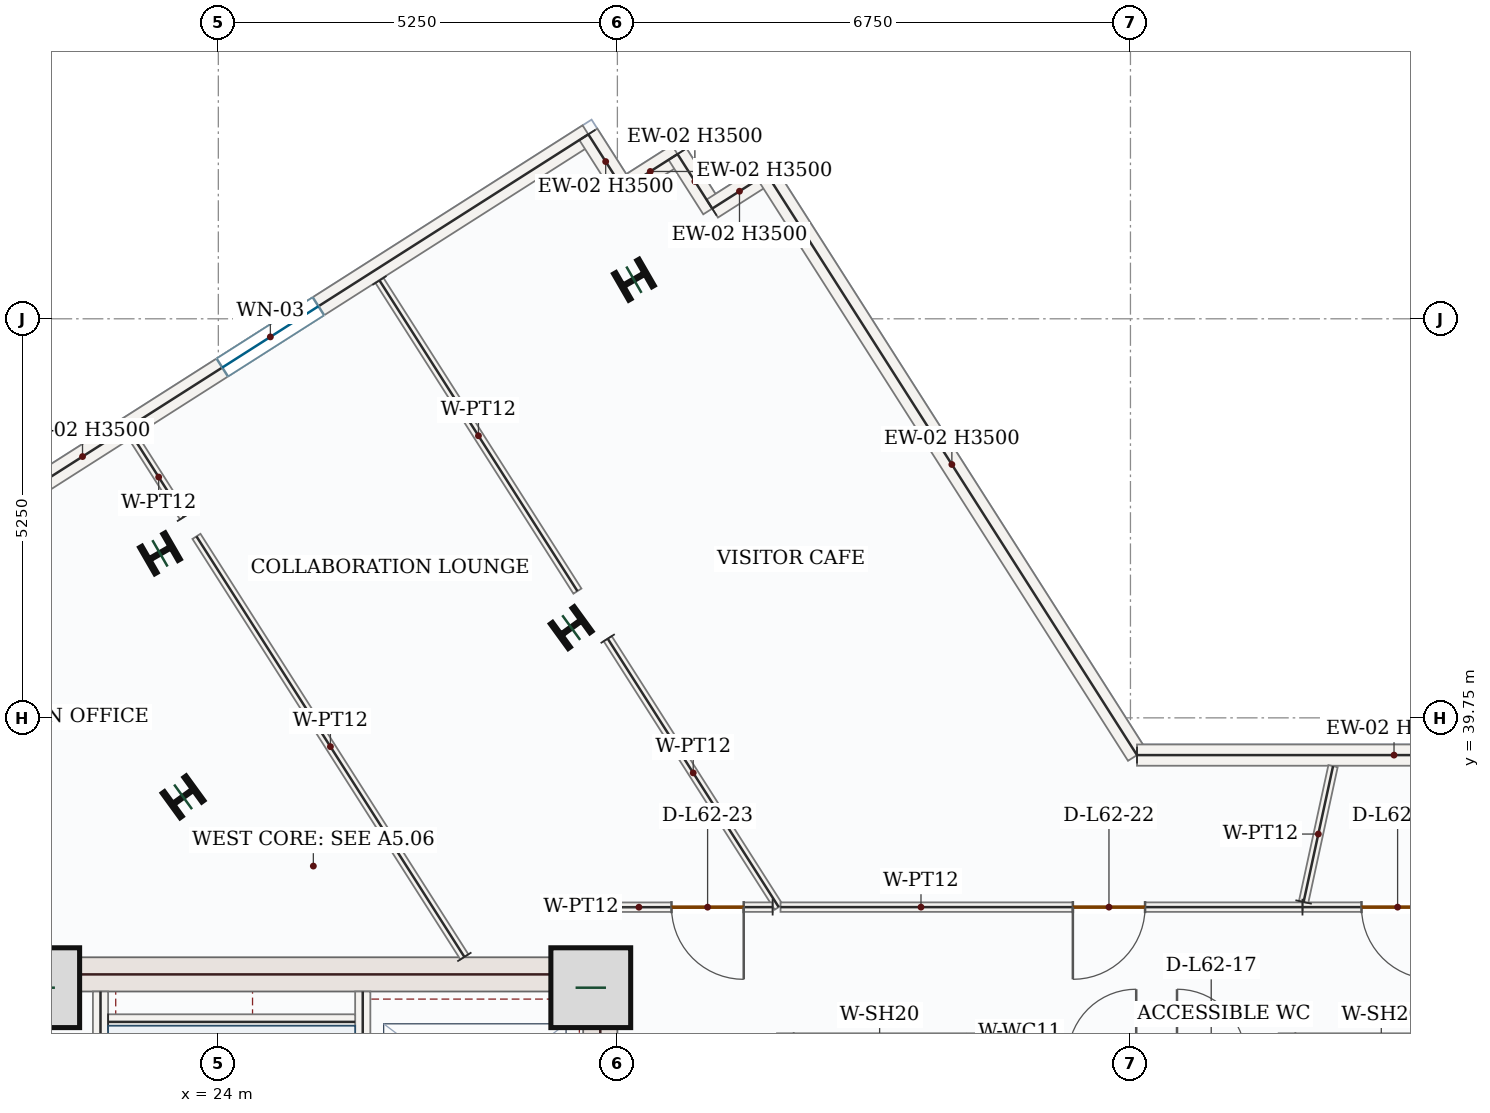
"""IFC4 building model, lengths in metres.
Left out: names, types, materials, properties, quantities, classifications, styles, units other than length and angle.
Written with IfcOpenShell. Run it as: python <this file> out.ifc"""

import sys

from ifc_helpers import new_model, si_unit, direction, frame, frame_2d, origin, origin_2d, place, context, subcontext, project, spatial, rectangle, i_section, extrude, source, transform, mapped, element, fill, save


model = new_model("IFC4")
c1 = context("Model", 3, precision=1e-05, world=origin(), true_north=direction((0.0, 1.0)))
c2 = subcontext(c1, "Body", "Model", "MODEL_VIEW")
j1 = project(units=[si_unit("LENGTHUNIT", "METRE"), si_unit("PLANEANGLEUNIT", "RADIAN")], contexts=[c1])
p1 = place(None, origin())
s1 = spatial("IfcSite", under=j1, at=p1, CompositionType="ELEMENT")
p2 = place(p1, origin())
s2 = spatial("IfcBuilding", under=s1, at=p2, CompositionType="ELEMENT")
p3 = place(p2, frame((0.0, 0.0, 261.6)))
s3 = spatial("IfcBuildingStorey", under=s2, at=p3, CompositionType="ELEMENT", Elevation=261.6)
p4 = place(p3, frame((29.025, 28.05, 0.0), z_axis=(0.0, 0.0, 1.0), x_axis=(0.0, 1.0, 0.0)))
e1 = element("IfcWall", 1, at=p4, inside=s3, PredefinedType="SHEAR", context=c2, shape_type="SweptSolid", body=[
    extrude(rectangle(XDim=8.55, YDim=0.45, at=frame_2d((4.275, 0.0))), origin(), (0.0, 0.0, 1.0), 3.5),
])
p5 = place(p4, frame((1.5, 0.0, 0.0)))
e2 = element("IfcOpeningElement", 2, at=p5, cuts=e1, PredefinedType="OPENING", context=c2, shape_type="SweptSolid", body=[
    extrude(rectangle(XDim=1.1, YDim=2.2, at=frame_2d((0.55, 1.1))), frame((0.0, 0.235, 0.0), z_axis=(0.0, -1.0, 0.0), x_axis=(1.0, 0.0, 0.0)), (0.0, 0.0, 1.0), 0.47),
])
m1 = source(origin(), c2, "Body", "SweptSolid", [
    extrude(rectangle(XDim=7.1, YDim=0.45, at=frame_2d((3.55, 0.0))), origin(), (0.0, 0.0, 1.0), 3.5),
])
p6 = place(p3, frame((21.7, 36.375, 0.0), z_axis=(0.0, 0.0, 1.0), x_axis=(1.0, 0.0, 0.0)))
e3 = element("IfcWall", 3, at=p6, inside=s3, PredefinedType="SHEAR", context=c2, shape_type="MappedRepresentation", body=[
    mapped(m1, transform((0.0, 0.0, 0.0), x_axis=(1.0, 0.0, 0.0), y_axis=(0.0, 1.0, 0.0), z_axis=(0.0, 0.0, 1.0), scale=1.0)),
])
m2 = source(origin(), c2, "Body", "SweptSolid", [
    extrude(rectangle(XDim=1.05, YDim=1.05, at=origin_2d()), origin(), (0.0, 0.0, 1.0), 3.75),
])
for number, where, z_axis, x_axis in (
    (4, (21.65, 36.2, 0.0), (0.0, 0.0, 1.0), (1.0, 0.0, 0.0)),
    (5, (28.9, 36.2, 0.0), (0.0, 0.0, 1.0), (1.0, 0.0, 0.0)),
):
    element("IfcColumn", number, at=place(p3, frame(where, z_axis=z_axis, x_axis=x_axis)), inside=s3, PredefinedType="COLUMN", context=c2, shape_type="MappedRepresentation", body=[
        mapped(m2, transform((0.0, 0.0, 0.0), x_axis=(1.0, 0.0, 0.0), y_axis=(0.0, 1.0, 0.0), z_axis=(0.0, 0.0, 1.0), scale=1.0)),
    ])
m3 = source(origin(), c2, "Body", "SweptSolid", [
    extrude(i_section(OverallWidth=0.399, OverallDepth=0.386, WebThickness=0.021, FlangeThickness=0.033, FilletRadius=0.018, at=origin_2d()), origin(), (0.0, 0.0, 1.0), 3.75),
])
for number, where, z_axis, x_axis in (
    (6, (28.643, 40.937, 0.0), (0.0, 0.0, 1.0), (-0.588, 0.809, 0.0)),
    (7, (23.536, 38.711, 0.0), (0.0, 0.0, 1.0), (-0.588, 0.809, 0.0)),
    (8, (29.468, 45.514, 0.0), (0.0, 0.0, 1.0), (-0.5, 0.866, 0.0)),
    (9, (23.232, 41.914, 0.0), (0.0, 0.0, 1.0), (-0.5, 0.866, 0.0)),
):
    element("IfcColumn", number, at=place(p3, frame(where, z_axis=z_axis, x_axis=x_axis)), inside=s3, PredefinedType="COLUMN", context=c2, shape_type="MappedRepresentation", body=[
        mapped(m3, transform((0.0, 0.0, 0.0), x_axis=(1.0, 0.0, 0.0), y_axis=(0.0, 1.0, 0.0), z_axis=(0.0, 0.0, 1.0), scale=1.0)),
    ])
p7 = place(p3, frame((20.501, 42.097, 0.0), z_axis=(0.0, 0.0, 1.0), x_axis=(0.843388777764, 0.537303796322, 0.0)))
e10 = element("IfcWall", 10, at=p7, inside=s3, PredefinedType="SOLIDWALL", context=c2, shape_type="SweptSolid", body=[
    extrude(rectangle(XDim=9.92, YDim=0.28, at=frame_2d((4.96, 0.0))), origin(), (0.0, 0.0, 1.0), 3.5),
])
p8 = place(p7, frame((4.21, 0.0, 0.85)))
e11 = element("IfcOpeningElement", 11, at=p8, cuts=e10, PredefinedType="OPENING", context=c2, shape_type="SweptSolid", body=[
    extrude(rectangle(XDim=1.5, YDim=1.5, at=frame_2d((0.75, 0.75))), frame((0.0, 0.15, 0.0), z_axis=(0.0, -1.0, 0.0), x_axis=(1.0, 0.0, 0.0)), (0.0, 0.0, 1.0), 0.3),
])
m4 = source(origin(), c2, "Body", "SweptSolid", [
    extrude(rectangle(XDim=0.85, YDim=0.28, at=frame_2d((0.425, 0.0))), origin(), (0.0, 0.0, 1.0), 3.5),
])
p9 = place(p3, frame((28.868, 47.427, 0.0), z_axis=(0.0, 0.0, 1.0), x_axis=(0.537210044462, -0.843448497615, 0.0)))
e12 = element("IfcWall", 12, at=p9, inside=s3, PredefinedType="SOLIDWALL", context=c2, shape_type="MappedRepresentation", body=[
    mapped(m4, transform((0.0, 0.0, 0.0), x_axis=(1.0, 0.0, 0.0), y_axis=(0.0, 1.0, 0.0), z_axis=(0.0, 0.0, 1.0), scale=1.0)),
])
m5 = source(origin(), c2, "Body", "SweptSolid", [
    extrude(rectangle(XDim=0.85, YDim=0.28, at=frame_2d((0.425, 0.0))), origin(), (0.0, 0.0, 1.0), 3.5),
])
p10 = place(p3, frame((29.324, 46.71, 0.0), z_axis=(0.0, 0.0, 1.0), x_axis=(0.843531374408, 0.537079901308, 0.0)))
e13 = element("IfcWall", 13, at=p10, inside=s3, PredefinedType="SOLIDWALL", context=c2, shape_type="MappedRepresentation", body=[
    mapped(m5, transform((0.0, 0.0, 0.0), x_axis=(1.0, 0.0, 0.0), y_axis=(0.0, 1.0, 0.0), z_axis=(0.0, 0.0, 1.0), scale=1.0)),
])
for number, where, z_axis, x_axis in (
    (14, (30.041, 47.167, 0.0), (0.0, 0.0, 1.0), (0.537, -0.843, 0.0)),
    (15, (30.498, 46.45, 0.0), (0.0, 0.0, 1.0), (0.843, 0.537, 0.0)),
):
    element("IfcWall", number, at=place(p3, frame(where, z_axis=z_axis, x_axis=x_axis)), inside=s3, PredefinedType="SOLIDWALL", context=c2, shape_type="MappedRepresentation", body=[
        mapped(m4, transform((0.0, 0.0, 0.0), x_axis=(1.0, 0.0, 0.0), y_axis=(0.0, 1.0, 0.0), z_axis=(0.0, 0.0, 1.0), scale=1.0)),
    ])
m6 = source(origin(), c2, "Body", "SweptSolid", [
    extrude(rectangle(XDim=9.066, YDim=0.28, at=frame_2d((4.533, 0.0))), origin(), (0.0, 0.0, 1.0), 3.5),
])
p11 = place(p3, frame((31.215, 46.906, 0.0), z_axis=(0.0, 0.0, 1.0), x_axis=(0.537298831286, -0.843391940855, 0.0)))
e16 = element("IfcWall", 16, at=p11, inside=s3, PredefinedType="SOLIDWALL", context=c2, shape_type="MappedRepresentation", body=[
    mapped(m6, transform((0.0, 0.0, 0.0), x_axis=(1.0, 0.0, 0.0), y_axis=(0.0, 1.0, 0.0), z_axis=(0.0, 0.0, 1.0), scale=1.0)),
])
m7 = source(origin(), c2, "Body", "SweptSolid", [
    extrude(rectangle(XDim=6.763, YDim=0.28, at=frame_2d((3.381, 0.0))), origin(), (0.0, 0.0, 1.0), 2.772),
])
p12 = place(p3, frame((36.086, 39.26, 0.0), z_axis=(0.0, 0.0, 1.0), x_axis=(1.0, 0.0, 0.0)))
e17 = element("IfcWall", 17, at=p12, inside=s3, PredefinedType="SOLIDWALL", context=c2, shape_type="MappedRepresentation", body=[
    mapped(m7, transform((0.0, 0.0, 0.0), x_axis=(1.0, 0.0, 0.0), y_axis=(0.0, 1.0, 0.0), z_axis=(0.0, 0.0, 1.0), scale=1.0)),
])
m8 = source(origin(), c2, "Body", "SweptSolid", [
    extrude(rectangle(XDim=7.87, YDim=0.2, at=frame_2d((3.935, 0.0))), origin(), (0.0, 0.0, 1.0), 3.5),
])
p13 = place(p3, frame((22.45, 28.28, 0.0), z_axis=(0.0, 0.0, 1.0), x_axis=(0.0, 1.0, 0.0)))
e18 = element("IfcWall", 18, at=p13, inside=s3, PredefinedType="SOLIDWALL", context=c2, shape_type="MappedRepresentation", body=[
    mapped(m8, transform((0.0, 0.0, 0.0), x_axis=(1.0, 0.0, 0.0), y_axis=(0.0, 1.0, 0.0), z_axis=(0.0, 0.0, 1.0), scale=1.0)),
])
p14 = place(p3, frame((25.9, 28.15, 0.0), z_axis=(0.0, 0.0, 1.0), x_axis=(0.0, 1.0, 0.0)))
e19 = element("IfcWall", 19, at=p14, inside=s3, PredefinedType="SOLIDWALL", context=c2, shape_type="SweptSolid", body=[
    extrude(rectangle(XDim=8.0, YDim=0.2, at=frame_2d((4.0, 0.0))), origin(), (0.0, 0.0, 1.0), 3.5),
])
p15 = place(p14, frame((0.4, 0.0, 0.0)))
e20 = element("IfcOpeningElement", 20, at=p15, cuts=e19, PredefinedType="OPENING", context=c2, shape_type="SweptSolid", body=[
    extrude(rectangle(XDim=1.05, YDim=2.15, at=frame_2d((0.525, 1.075))), frame((0.0, 0.11, 0.0), z_axis=(0.0, -1.0, 0.0), x_axis=(1.0, 0.0, 0.0)), (0.0, 0.0, 1.0), 0.22),
])
m9 = source(origin(), c2, "Body", "SweptSolid", [
    extrude(rectangle(XDim=3.25, YDim=0.2, at=frame_2d((1.625, 0.0))), origin(), (0.0, 0.0, 1.0), 3.5),
])
p16 = place(p3, frame((22.55, 35.75, 0.0), z_axis=(0.0, 0.0, 1.0), x_axis=(1.0, 0.0, 0.0)))
e21 = element("IfcWall", 21, at=p16, inside=s3, PredefinedType="SOLIDWALL", context=c2, shape_type="MappedRepresentation", body=[
    mapped(m9, transform((0.0, 0.0, 0.0), x_axis=(1.0, 0.0, 0.0), y_axis=(0.0, 1.0, 0.0), z_axis=(0.0, 0.0, 1.0), scale=1.0)),
])
p17 = place(p3, frame((31.45, 33.2, 0.0), z_axis=(0.0, 0.0, 1.0), x_axis=(0.0, 1.0, 0.0)))
e22 = element("IfcWall", 22, at=p17, inside=s3, PredefinedType="SOLIDWALL", context=c2, shape_type="SweptSolid", body=[
    extrude(rectangle(XDim=2.4, YDim=0.2, at=frame_2d((1.2, 0.0))), origin(), (0.0, 0.0, 1.0), 3.5),
])
p18 = place(p17, frame((0.65, 0.0, 0.0)))
e23 = element("IfcOpeningElement", 23, at=p18, cuts=e22, PredefinedType="OPENING", context=c2, shape_type="SweptSolid", body=[
    extrude(rectangle(XDim=1.1, YDim=2.15, at=frame_2d((0.55, 1.075))), frame((0.0, 0.11, 0.0), z_axis=(0.0, -1.0, 0.0), x_axis=(1.0, 0.0, 0.0)), (0.0, 0.0, 1.0), 0.22),
])
m10 = source(origin(), c2, "Body", "SweptSolid", [
    extrude(rectangle(XDim=2.4, YDim=0.2, at=frame_2d((1.2, 0.0))), origin(), (0.0, 0.0, 1.0), 3.5),
])
for number, where, z_axis, x_axis in (
    (24, (33.95, 33.2, 0.0), (0.0, 0.0, 1.0), (0.0, 1.0, 0.0)),
    (25, (38.05, 33.2, 0.0), (0.0, 0.0, 1.0), (0.0, 1.0, 0.0)),
):
    element("IfcWall", number, at=place(p3, frame(where, z_axis=z_axis, x_axis=x_axis)), inside=s3, PredefinedType="SOLIDWALL", context=c2, shape_type="MappedRepresentation", body=[
        mapped(m10, transform((0.0, 0.0, 0.0), x_axis=(1.0, 0.0, 0.0), y_axis=(0.0, 1.0, 0.0), z_axis=(0.0, 0.0, 1.0), scale=1.0)),
    ])
m11 = source(origin(), c2, "Body", "SweptSolid", [
    extrude(rectangle(XDim=4.188, YDim=0.125, at=frame_2d((2.094, 0.0))), origin(), (0.0, 0.0, 1.0), 3.5),
])
p19 = place(p3, frame((29.123, 40.792, 0.0), z_axis=(0.0, 0.0, 1.0), x_axis=(0.537264008944, -0.843414124078, 0.0)))
e26 = element("IfcWall", 26, at=p19, inside=s3, PredefinedType="PARTITIONING", context=c2, shape_type="MappedRepresentation", body=[
    mapped(m11, transform((0.0, 0.0, 0.0), x_axis=(1.0, 0.0, 0.0), y_axis=(0.0, 1.0, 0.0), z_axis=(0.0, 0.0, 1.0), scale=1.0)),
])
p20 = place(p3, frame((31.292, 37.26, 0.0), z_axis=(0.0, 0.0, 1.0), x_axis=(-0.999999820546, -0.000599089277, 0.0)))
e27 = element("IfcWall", 27, at=p20, inside=s3, PredefinedType="PARTITIONING", context=c2, shape_type="SweptSolid", body=[
    extrude(rectangle(XDim=2.038, YDim=0.125, at=frame_2d((1.019, 0.0))), origin(), (0.0, 0.0, 1.0), 3.5),
])
p21 = place(p20, frame((0.381, 0.0, 0.0)))
e28 = element("IfcOpeningElement", 28, at=p21, cuts=e27, PredefinedType="OPENING", context=c2, shape_type="SweptSolid", body=[
    extrude(rectangle(XDim=0.95, YDim=2.15, at=frame_2d((0.475, 1.075))), frame((0.0, 0.073, 0.0), z_axis=(0.0, -1.0, 0.0), x_axis=(1.0, 0.0, 0.0)), (0.0, 0.0, 1.0), 0.145),
])
m12 = source(origin(), c2, "Body", "SweptSolid", [
    extrude(rectangle(XDim=6.56, YDim=0.125, at=frame_2d((3.28, 0.0))), origin(), (0.0, 0.0, 1.0), 3.5),
])
p22 = place(p3, frame((27.237, 36.605, 0.0), z_axis=(0.0, 0.0, 1.0), x_axis=(-0.537282422054, 0.843402394443, 0.0)))
e29 = element("IfcWall", 29, at=p22, inside=s3, PredefinedType="PARTITIONING", context=c2, shape_type="MappedRepresentation", body=[
    mapped(m12, transform((0.0, 0.0, 0.0), x_axis=(1.0, 0.0, 0.0), y_axis=(0.0, 1.0, 0.0), z_axis=(0.0, 0.0, 1.0), scale=1.0)),
])
m13 = source(origin(), c2, "Body", "SweptSolid", [
    extrude(rectangle(XDim=1.241, YDim=0.125, at=frame_2d((0.621, 0.0))), origin(), (0.0, 0.0, 1.0), 3.5),
])
p23 = place(p3, frame((23.549, 42.394, 0.0), z_axis=(0.0, 0.0, 1.0), x_axis=(-0.537244446477, 0.843426585264, 0.0)))
e30 = element("IfcWall", 30, at=p23, inside=s3, PredefinedType="PARTITIONING", context=c2, shape_type="MappedRepresentation", body=[
    mapped(m13, transform((0.0, 0.0, 0.0), x_axis=(1.0, 0.0, 0.0), y_axis=(0.0, 1.0, 0.0), z_axis=(0.0, 0.0, 1.0), scale=1.0)),
])
m14 = source(origin(), c2, "Body", "SweptSolid", [
    extrude(rectangle(XDim=4.846, YDim=0.125, at=frame_2d((2.423, 0.0))), origin(), (0.0, 0.0, 1.0), 3.5),
])
p24 = place(p3, frame((26.12, 45.505, 0.0), z_axis=(0.0, 0.0, 1.0), x_axis=(0.537305688893, -0.843387572047, 0.0)))
e31 = element("IfcWall", 31, at=p24, inside=s3, PredefinedType="PARTITIONING", context=c2, shape_type="MappedRepresentation", body=[
    mapped(m14, transform((0.0, 0.0, 0.0), x_axis=(1.0, 0.0, 0.0), y_axis=(0.0, 1.0, 0.0), z_axis=(0.0, 0.0, 1.0), scale=1.0)),
])
p25 = place(p3, frame((42.742, 37.26, 0.0), z_axis=(0.0, 0.0, 1.0), x_axis=(-0.999999998515, 5.4504824e-05, 0.0)))
e32 = element("IfcWall", 32, at=p25, inside=s3, PredefinedType="PARTITIONING", context=c2, shape_type="SweptSolid", body=[
    extrude(rectangle(XDim=4.479, YDim=0.125, at=frame_2d((2.24, 0.0))), origin(), (0.0, 0.0, 1.0), 3.5),
])
p26 = place(p25, frame((2.753, 0.0, 0.0)))
e33 = element("IfcOpeningElement", 33, at=p26, cuts=e32, PredefinedType="OPENING", context=c2, shape_type="SweptSolid", body=[
    extrude(rectangle(XDim=0.95, YDim=2.15, at=frame_2d((0.475, 1.075))), frame((0.0, 0.073, 0.0), z_axis=(0.0, -1.0, 0.0), x_axis=(1.0, 0.0, 0.0)), (0.0, 0.0, 1.0), 0.145),
])
m15 = source(origin(), c2, "Body", "SweptSolid", [
    extrude(rectangle(XDim=1.829, YDim=0.125, at=frame_2d((0.915, 0.0))), origin(), (0.0, 0.0, 1.0), 3.5),
])
p27 = place(p3, frame((38.278, 37.327, 0.0), z_axis=(0.0, 0.0, 1.0), x_axis=(0.21182559105, 0.977307484355, 0.0)))
e34 = element("IfcWall", 34, at=p27, inside=s3, PredefinedType="PARTITIONING", context=c2, shape_type="MappedRepresentation", body=[
    mapped(m15, transform((0.0, 0.0, 0.0), x_axis=(1.0, 0.0, 0.0), y_axis=(0.0, 1.0, 0.0), z_axis=(0.0, 0.0, 1.0), scale=1.0)),
])
p28 = place(p3, frame((38.263, 37.26, 0.0), z_axis=(0.0, 0.0, 1.0), x_axis=(-1.0, 0.0, 0.0)))
e35 = element("IfcWall", 35, at=p28, inside=s3, PredefinedType="PARTITIONING", context=c2, shape_type="SweptSolid", body=[
    extrude(rectangle(XDim=6.867, YDim=0.125, at=frame_2d((3.434, 0.0))), origin(), (0.0, 0.0, 1.0), 3.5),
])
p29 = place(p28, frame((2.071, 0.0, 0.0)))
e36 = element("IfcOpeningElement", 36, at=p29, cuts=e35, PredefinedType="OPENING", context=c2, shape_type="SweptSolid", body=[
    extrude(rectangle(XDim=0.95, YDim=2.15, at=frame_2d((0.475, 1.075))), frame((0.0, 0.073, 0.0), z_axis=(0.0, -1.0, 0.0), x_axis=(1.0, 0.0, 0.0)), (0.0, 0.0, 1.0), 0.145),
])
m16 = source(origin(), c2, "Body", "SweptSolid", [
    extrude(rectangle(XDim=1.5, YDim=1.5, at=frame_2d((0.75, 0.75))), frame((0.0, 0.03, 0.0), z_axis=(0.0, -1.0, 0.0), x_axis=(1.0, 0.0, 0.0)), (0.0, 0.0, 1.0), 0.06),
])
p30 = place(p8, origin())
e37 = element("IfcWindow", 37, at=p30, inside=s3, PartitioningType="SINGLE_PANEL", PredefinedType="WINDOW", context=c2, shape_type="MappedRepresentation", body=[
    mapped(m16, transform((0.0, 0.0, 0.0), x_axis=(1.0, 0.0, 0.0), y_axis=(0.0, 1.0, 0.0), z_axis=(0.0, 0.0, 1.0), scale=1.0)),
])
fill(e11, e37)
m17 = source(origin(), c2, "Body", "SweptSolid", [
    extrude(rectangle(XDim=0.95, YDim=2.15, at=frame_2d((0.475, 1.075))), frame((0.0, 0.025, 0.0), z_axis=(0.0, -1.0, 0.0), x_axis=(1.0, 0.0, 0.0)), (0.0, 0.0, 1.0), 0.05),
])
p31 = place(p26, origin())
e38 = element("IfcDoor", 38, at=p31, inside=s3, OperationType="SINGLE_SWING_LEFT", PredefinedType="DOOR", context=c2, shape_type="MappedRepresentation", body=[
    mapped(m17, transform((0.0, 0.0, 0.0), x_axis=(1.0, 0.0, 0.0), y_axis=(0.0, 1.0, 0.0), z_axis=(0.0, 0.0, 1.0), scale=1.0)),
])
fill(e33, e38)
p32 = place(p29, origin())
e39 = element("IfcDoor", 39, at=p32, inside=s3, OperationType="SINGLE_SWING_RIGHT", PredefinedType="DOOR", context=c2, shape_type="MappedRepresentation", body=[
    mapped(m17, transform((0.0, 0.0, 0.0), x_axis=(1.0, 0.0, 0.0), y_axis=(0.0, 1.0, 0.0), z_axis=(0.0, 0.0, 1.0), scale=1.0)),
])
fill(e36, e39)
p33 = place(p21, origin())
e40 = element("IfcDoor", 40, at=p33, inside=s3, OperationType="SINGLE_SWING_LEFT", PredefinedType="DOOR", context=c2, shape_type="MappedRepresentation", body=[
    mapped(m17, transform((0.0, 0.0, 0.0), x_axis=(1.0, 0.0, 0.0), y_axis=(0.0, 1.0, 0.0), z_axis=(0.0, 0.0, 1.0), scale=1.0)),
])
fill(e28, e40)
save(model, sys.argv[1])
